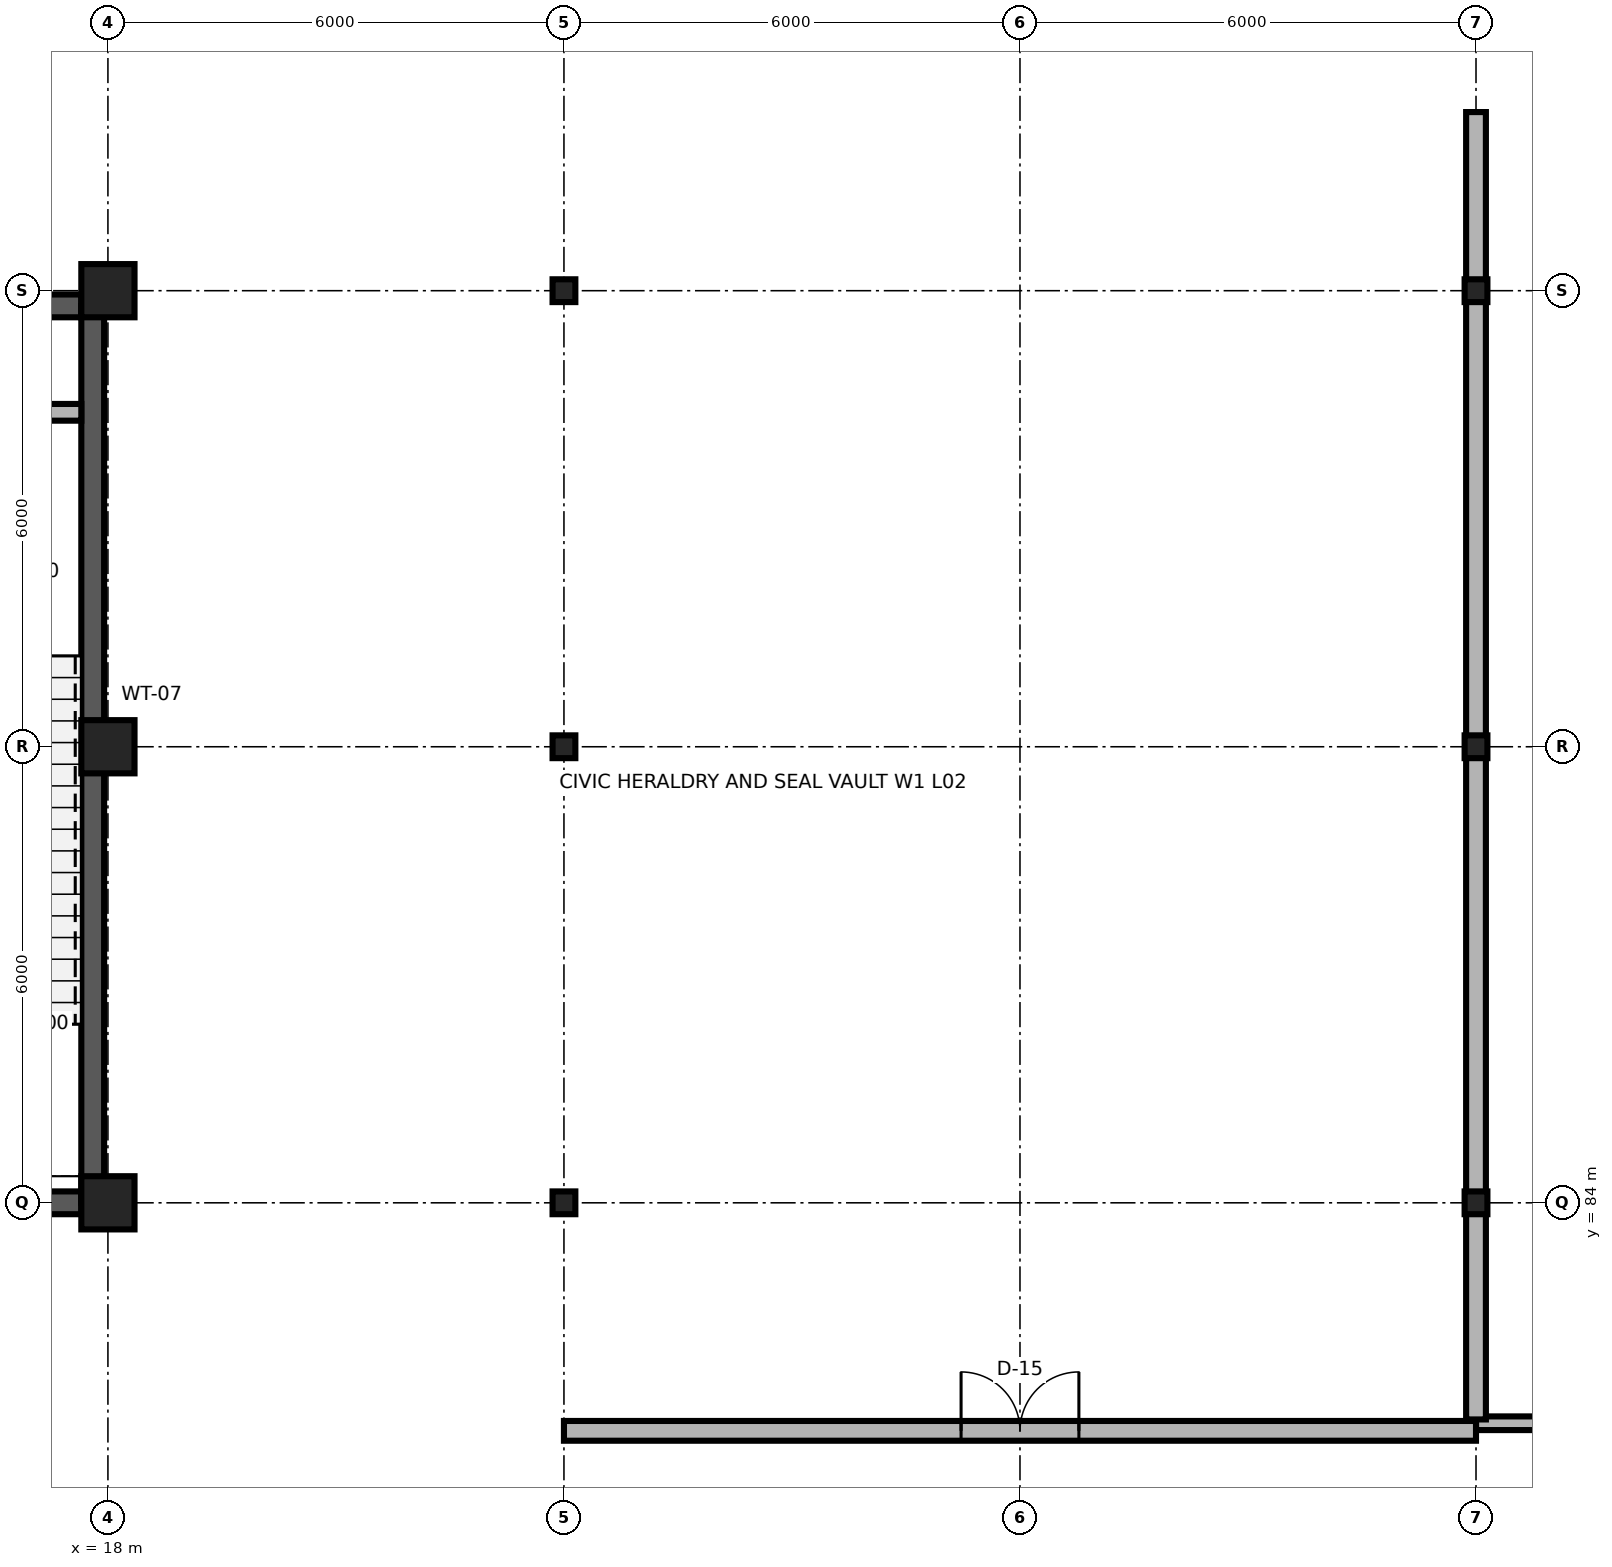
"""IFC4 building model, lengths in metres.
Left out: names, types, materials, properties, quantities, classifications, styles, units other than length and angle.
Written with IfcOpenShell. Run it as: python <this file> out.ifc"""

import sys

from ifc_helpers import new_model, si_unit, direction, frame, frame_2d, origin, origin_2d, place, context, subcontext, project, spatial, rectangle, i_section, extrude, element, fill, save


model = new_model("IFC4")
c1 = context("Model", 3, precision=1e-05, world=origin(), true_north=direction((0.0, 1.0)))
c2 = subcontext(c1, "Body", "Model", "MODEL_VIEW")
j1 = project(units=[si_unit("LENGTHUNIT", "METRE"), si_unit("PLANEANGLEUNIT", "RADIAN")], contexts=[c1])
p1 = place(None, origin())
s1 = spatial("IfcSite", under=j1, at=p1, CompositionType="ELEMENT")
p2 = place(p1, origin())
s2 = spatial("IfcBuilding", under=s1, at=p2, CompositionType="ELEMENT")
p3 = place(p2, frame((0.0, 0.0, 6.0)))
s3 = spatial("IfcBuildingStorey", under=s2, at=p3, CompositionType="ELEMENT", Elevation=6.0)
p4 = place(p3, frame((18.0, 84.0, 0.0), z_axis=(0.0, 0.0, 1.0), x_axis=(1.0, 0.0, 0.0)))
e1 = element("IfcColumn", 1, at=p4, inside=s3, PredefinedType="COLUMN", context=c2, shape_type="SweptSolid", body=[
    extrude(rectangle(XDim=0.7, YDim=0.7, at=origin_2d()), origin(), (0.0, 0.0, 1.0), 6.0),
])
for number, where, z_axis, x_axis in (
    (2, (24.0, 84.0, 0.0), (0.0, 0.0, 1.0), (1.0, 0.0, 0.0)),
    (3, (36.0, 84.0, 0.0), (0.0, 0.0, 1.0), (1.0, 0.0, 0.0)),
):
    element("IfcColumn", number, at=place(p3, frame(where, z_axis=z_axis, x_axis=x_axis)), inside=s3, PredefinedType="COLUMN", context=c2, shape_type="SweptSolid", body=[
        extrude(i_section(OverallWidth=0.3, OverallDepth=0.3, WebThickness=0.01, FlangeThickness=0.015, FilletRadius=0.018, at=origin_2d()), origin(), (0.0, 0.0, 1.0), 6.0),
    ])
p5 = place(p3, frame((18.0, 90.0, 0.0), z_axis=(0.0, 0.0, 1.0), x_axis=(1.0, 0.0, 0.0)))
e4 = element("IfcColumn", 4, at=p5, inside=s3, PredefinedType="COLUMN", context=c2, shape_type="SweptSolid", body=[
    extrude(rectangle(XDim=0.7, YDim=0.7, at=origin_2d()), origin(), (0.0, 0.0, 1.0), 6.0),
])
for number, where, z_axis, x_axis in (
    (5, (24.0, 90.0, 0.0), (0.0, 0.0, 1.0), (1.0, 0.0, 0.0)),
    (6, (36.0, 90.0, 0.0), (0.0, 0.0, 1.0), (1.0, 0.0, 0.0)),
):
    element("IfcColumn", number, at=place(p3, frame(where, z_axis=z_axis, x_axis=x_axis)), inside=s3, PredefinedType="COLUMN", context=c2, shape_type="SweptSolid", body=[
        extrude(i_section(OverallWidth=0.3, OverallDepth=0.3, WebThickness=0.01, FlangeThickness=0.015, FilletRadius=0.018, at=origin_2d()), origin(), (0.0, 0.0, 1.0), 6.0),
    ])
p6 = place(p3, frame((18.0, 96.0, 0.0), z_axis=(0.0, 0.0, 1.0), x_axis=(1.0, 0.0, 0.0)))
e7 = element("IfcColumn", 7, at=p6, inside=s3, PredefinedType="COLUMN", context=c2, shape_type="SweptSolid", body=[
    extrude(rectangle(XDim=0.7, YDim=0.7, at=origin_2d()), origin(), (0.0, 0.0, 1.0), 6.0),
])
for number, where, z_axis, x_axis in (
    (8, (24.0, 96.0, 0.0), (0.0, 0.0, 1.0), (1.0, 0.0, 0.0)),
    (9, (36.0, 96.0, 0.0), (0.0, 0.0, 1.0), (1.0, 0.0, 0.0)),
):
    element("IfcColumn", number, at=place(p3, frame(where, z_axis=z_axis, x_axis=x_axis)), inside=s3, PredefinedType="COLUMN", context=c2, shape_type="SweptSolid", body=[
        extrude(i_section(OverallWidth=0.3, OverallDepth=0.3, WebThickness=0.01, FlangeThickness=0.015, FilletRadius=0.018, at=origin_2d()), origin(), (0.0, 0.0, 1.0), 6.0),
    ])
p7 = place(p3, frame((12.35, 84.0, 0.0), z_axis=(0.0, 0.0, 1.0), x_axis=(1.0, 0.0, 0.0)))
e10 = element("IfcWall", 10, at=p7, inside=s3, PredefinedType="SHEAR", context=c2, shape_type="SweptSolid", body=[
    extrude(rectangle(XDim=5.3, YDim=0.3, at=frame_2d((2.65, 0.0))), origin(), (0.0, 0.0, 1.0), 5.76),
])
p8 = place(p7, frame((1.925, 0.0, 0.0)))
e11 = element("IfcOpeningElement", 11, at=p8, cuts=e10, PredefinedType="OPENING", context=c2, shape_type="SweptSolid", body=[
    extrude(rectangle(XDim=1.45, YDim=2.25, at=frame_2d((0.725, 1.125))), frame((0.0, 0.165, 0.0), z_axis=(0.0, -1.0, 0.0), x_axis=(1.0, 0.0, 0.0)), (0.0, 0.0, 1.0), 0.33),
])
p9 = place(p3, frame((12.35, 95.8, 0.0), z_axis=(0.0, 0.0, 1.0), x_axis=(1.0, 0.0, 0.0)))
e12 = element("IfcWall", 12, at=p9, inside=s3, PredefinedType="SHEAR", context=c2, shape_type="SweptSolid", body=[
    extrude(rectangle(XDim=5.3, YDim=0.3, at=frame_2d((2.65, 0.0))), origin(), (0.0, 0.0, 1.0), 5.76),
])
p10 = place(p3, frame((17.8, 84.0, 0.0), z_axis=(0.0, 0.0, 1.0), x_axis=(0.0, 1.0, 0.0)))
e13 = element("IfcWall", 13, at=p10, inside=s3, PredefinedType="SHEAR", context=c2, shape_type="SweptSolid", body=[
    extrude(rectangle(XDim=11.8, YDim=0.3, at=frame_2d((5.9, 0.0))), origin(), (0.0, 0.0, 1.0), 5.76),
])
p11 = place(p3, frame((16.55, 94.4, 0.0), z_axis=(0.0, 0.0, 1.0), x_axis=(1.0, 0.0, 0.0)))
e14 = element("IfcWall", 14, at=p11, inside=s3, PredefinedType="PARTITIONING", context=c2, shape_type="SweptSolid", body=[
    extrude(rectangle(XDim=1.1, YDim=0.22, at=frame_2d((0.55, 0.0))), origin(), (0.0, 0.0, 1.0), 5.76),
])
p12 = place(p3, frame((36.0, 81.1, 0.0), z_axis=(0.0, 0.0, 1.0), x_axis=(1.0, 0.0, 0.0)))
e15 = element("IfcWall", 15, at=p12, inside=s3, PredefinedType="PARTITIONING", context=c2, shape_type="SweptSolid", body=[
    extrude(rectangle(XDim=12.0, YDim=0.18, at=frame_2d((6.0, 0.0))), origin(), (0.0, 0.0, 1.0), 5.76),
])
p13 = place(p12, frame((4.95, 0.0, 0.0)))
e16 = element("IfcOpeningElement", 16, at=p13, cuts=e15, PredefinedType="OPENING", context=c2, shape_type="SweptSolid", body=[
    extrude(rectangle(XDim=2.1, YDim=2.9, at=frame_2d((1.05, 1.45))), frame((0.0, 0.105, 0.0), z_axis=(0.0, -1.0, 0.0), x_axis=(1.0, 0.0, 0.0)), (0.0, 0.0, 1.0), 0.21),
])
p14 = place(p3, frame((24.0, 81.0, 0.0), z_axis=(0.0, 0.0, 1.0), x_axis=(1.0, 0.0, 0.0)))
e17 = element("IfcWall", 17, at=p14, inside=s3, PredefinedType="PARTITIONING", context=c2, shape_type="SweptSolid", body=[
    extrude(rectangle(XDim=12.0, YDim=0.26, at=frame_2d((6.0, 0.0))), origin(), (0.0, 0.0, 1.0), 5.76),
])
p15 = place(p14, frame((5.225, 0.0, 0.0)))
e18 = element("IfcOpeningElement", 18, at=p15, cuts=e17, PredefinedType="OPENING", context=c2, shape_type="SweptSolid", body=[
    extrude(rectangle(XDim=1.55, YDim=2.3, at=frame_2d((0.775, 1.15))), frame((0.0, 0.145, 0.0), z_axis=(0.0, -1.0, 0.0), x_axis=(1.0, 0.0, 0.0)), (0.0, 0.0, 1.0), 0.29),
])
p16 = place(p3, frame((36.0, 81.15, 0.0), z_axis=(0.0, 0.0, 1.0), x_axis=(0.0, 1.0, 0.0)))
e19 = element("IfcWall", 19, at=p16, inside=s3, PredefinedType="PARTITIONING", context=c2, shape_type="SweptSolid", body=[
    extrude(rectangle(XDim=17.2, YDim=0.26, at=frame_2d((8.6, 0.0))), origin(), (0.0, 0.0, 1.0), 5.32),
])
p17 = place(p15, origin())
e20 = element("IfcDoor", 20, at=p17, inside=s3, OperationType="DOUBLE_DOOR_SINGLE_SWING", PredefinedType="DOOR", context=c2, shape_type="SweptSolid", body=[
    extrude(rectangle(XDim=1.55, YDim=2.3, at=frame_2d((0.775, 1.15))), frame((0.0, 0.025, 0.0), z_axis=(0.0, -1.0, 0.0), x_axis=(1.0, 0.0, 0.0)), (0.0, 0.0, 1.0), 0.05),
])
fill(e18, e20)
save(model, sys.argv[1])
